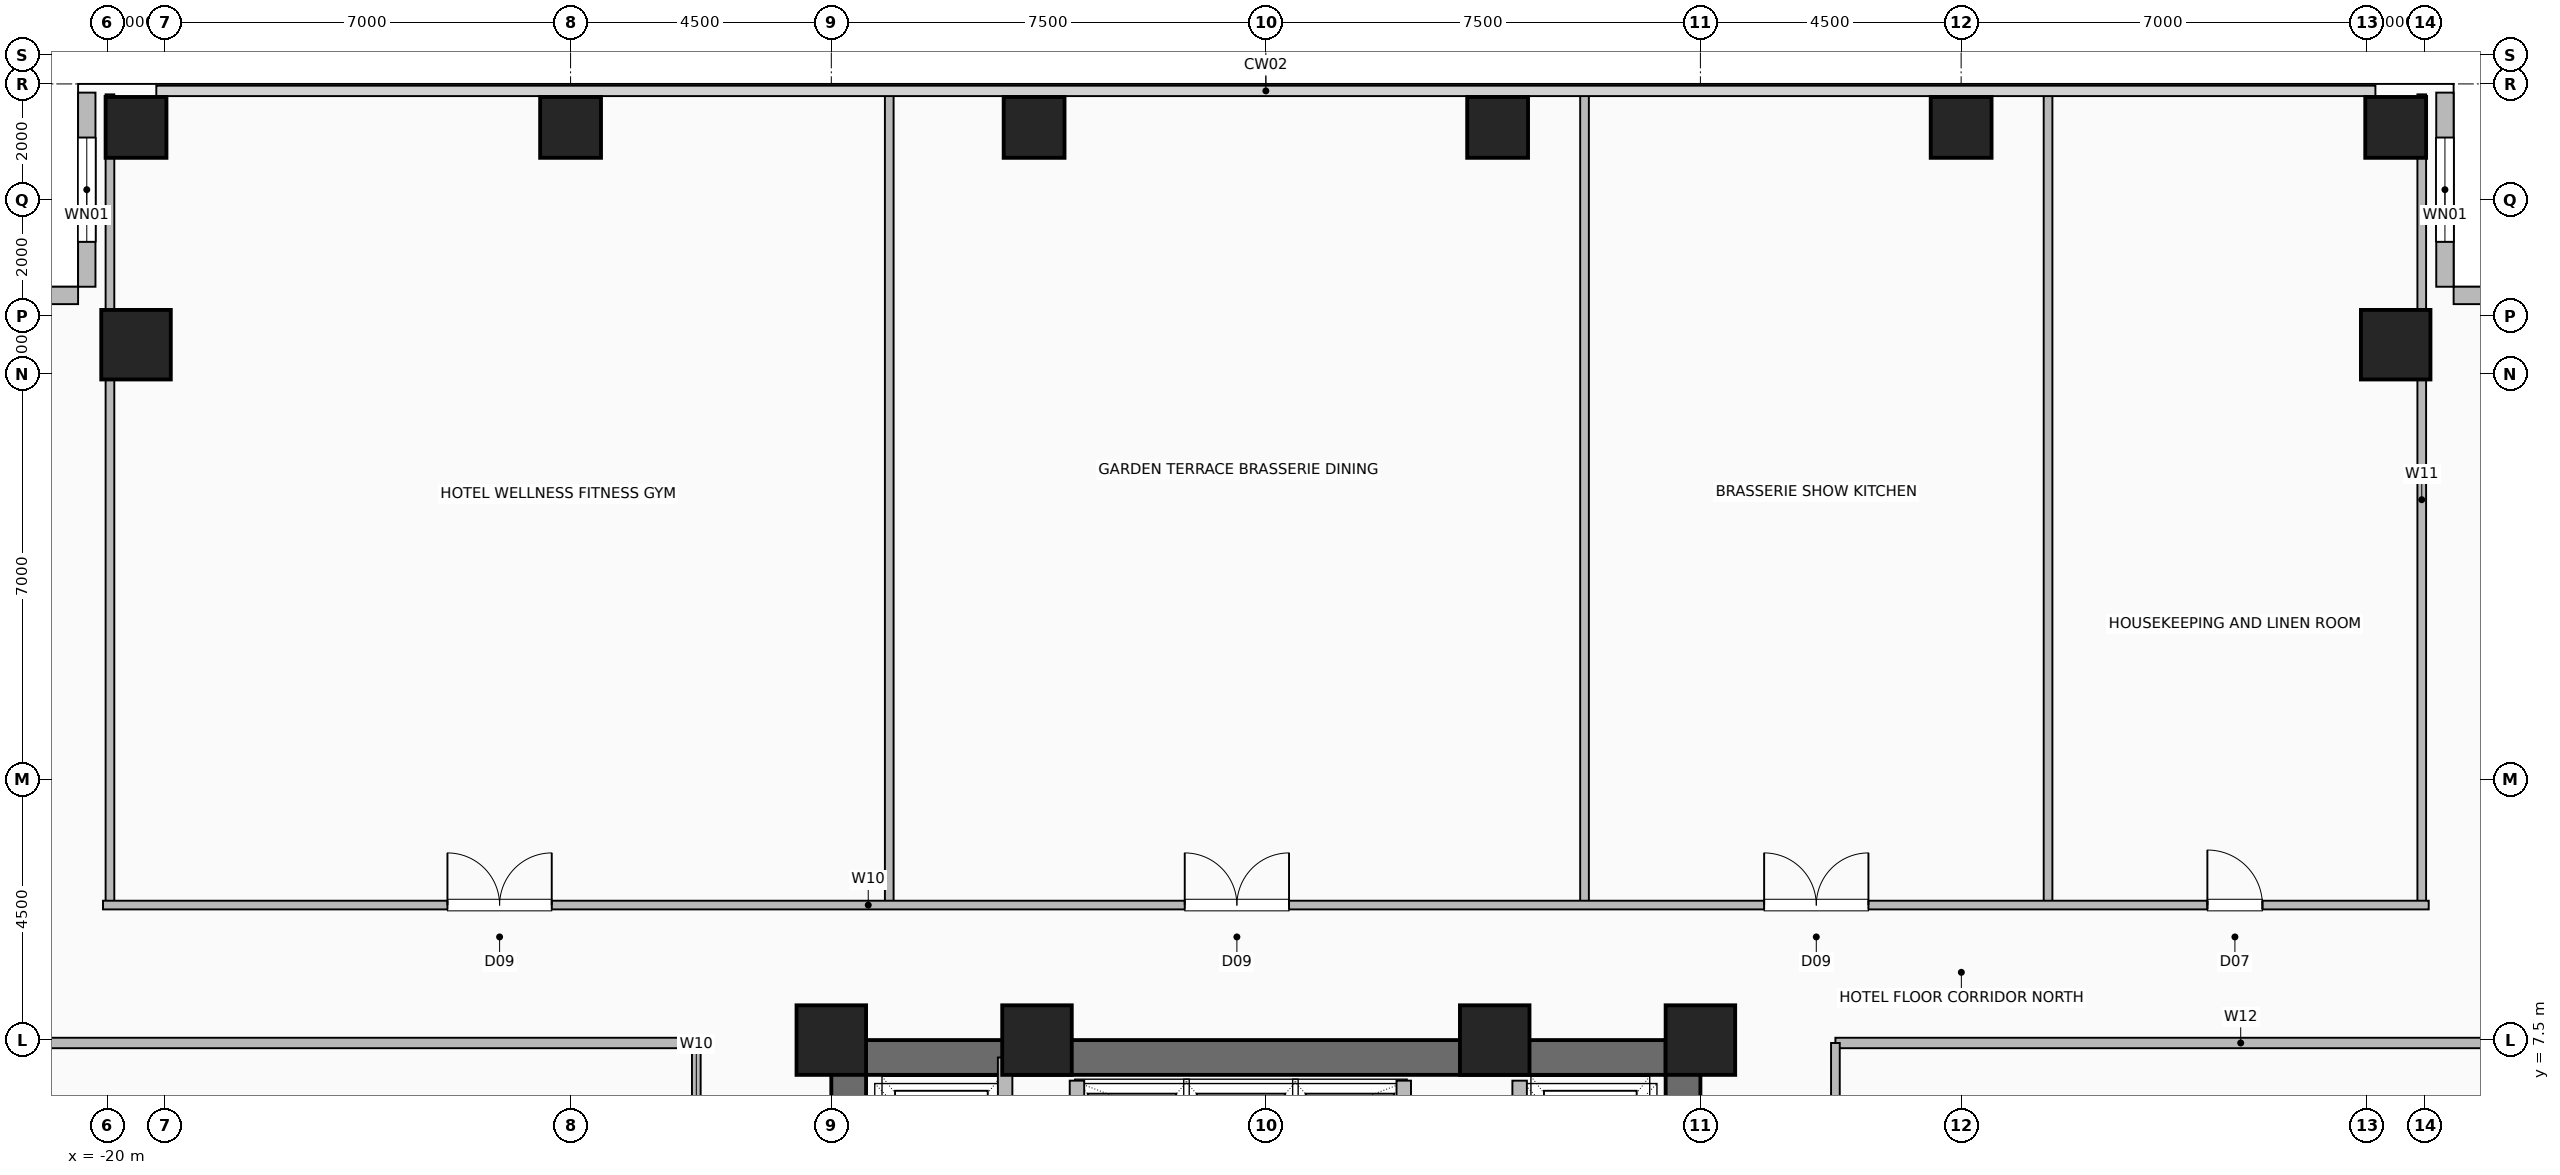
"""IFC4 building model, lengths in metres.
Left out: names, types, materials, properties, quantities, classifications, styles, units other than length and angle.
Written with IfcOpenShell. Run it as: python <this file> out.ifc"""

import sys

from ifc_helpers import new_model, si_unit, direction, frame, frame_2d, origin, origin_2d, place, context, subcontext, project, spatial, rectangle, hollow_rectangle, extrude, element, fill, save


model = new_model("IFC4")
c1 = context("Model", 3, precision=1e-05, world=origin(), true_north=direction((0.0, 1.0)))
c2 = subcontext(c1, "Body", "Model", "MODEL_VIEW")
j1 = project(units=[si_unit("LENGTHUNIT", "METRE"), si_unit("PLANEANGLEUNIT", "RADIAN")], contexts=[c1])
p1 = place(None, origin())
s1 = spatial("IfcSite", under=j1, at=p1, CompositionType="ELEMENT")
p2 = place(p1, origin())
s2 = spatial("IfcBuilding", under=s1, at=p2, CompositionType="ELEMENT")
p3 = place(p2, frame((0.0, 0.0, 51.5)))
s3 = spatial("IfcBuildingStorey", under=s2, at=p3, CompositionType="ELEMENT", Elevation=51.5)
for number, where, z_axis, x_axis in (
    (1, (7.5, 7.5, 0.0), (0.0, 0.0, 1.0), (1.0, 0.0, 0.0)),
    (2, (3.95, 7.5, 0.0), (0.0, 0.0, 1.0), (1.0, 0.0, 0.0)),
    (3, (-3.95, 7.5, 0.0), (0.0, 0.0, 1.0), (1.0, 0.0, 0.0)),
    (4, (-7.5, 7.5, 0.0), (0.0, 0.0, 1.0), (1.0, 0.0, 0.0)),
):
    element("IfcColumn", number, at=place(p3, frame(where, z_axis=z_axis, x_axis=x_axis)), inside=s3, PredefinedType="COLUMN", context=c2, shape_type="SweptSolid", body=[
        extrude(hollow_rectangle(XDim=1.2, YDim=1.2, WallThickness=0.055, at=origin_2d()), origin(), (0.0, 0.0, 1.0), 3.5),
    ])
for number, where, z_axis, x_axis in (
    (5, (-19.5, 23.25, 0.0), (0.0, 0.0, 1.0), (1.0, 0.0, 0.0)),
    (6, (-12.0, 23.25, 0.0), (0.0, 0.0, 1.0), (1.0, 0.0, 0.0)),
    (7, (-4.0, 23.25, 0.0), (0.0, 0.0, 1.0), (1.0, 0.0, 0.0)),
    (8, (4.0, 23.25, 0.0), (0.0, 0.0, 1.0), (1.0, 0.0, 0.0)),
    (9, (12.0, 23.25, 0.0), (0.0, 0.0, 1.0), (1.0, 0.0, 0.0)),
    (10, (19.5, 23.25, 0.0), (0.0, 0.0, 1.0), (1.0, 0.0, 0.0)),
):
    element("IfcColumn", number, at=place(p3, frame(where, z_axis=z_axis, x_axis=x_axis)), inside=s3, PredefinedType="COLUMN", context=c2, shape_type="SweptSolid", body=[
        extrude(hollow_rectangle(XDim=1.05, YDim=1.05, WallThickness=0.05, at=origin_2d()), origin(), (0.0, 0.0, 1.0), 3.5),
    ])
for number, where, z_axis, x_axis in (
    (11, (19.5, 19.5, 0.0), (0.0, 0.0, 1.0), (1.0, 0.0, 0.0)),
    (12, (-19.5, 19.5, 0.0), (0.0, 0.0, 1.0), (1.0, 0.0, 0.0)),
):
    element("IfcColumn", number, at=place(p3, frame(where, z_axis=z_axis, x_axis=x_axis)), inside=s3, PredefinedType="COLUMN", context=c2, shape_type="SweptSolid", body=[
        extrude(hollow_rectangle(XDim=1.2, YDim=1.2, WallThickness=0.055, at=origin_2d()), origin(), (0.0, 0.0, 1.0), 3.5),
    ])
p4 = place(p3, frame((20.35, 23.85, 0.0), z_axis=(0.0, 0.0, 1.0), x_axis=(0.0, -1.0, 0.0)))
e13 = element("IfcWall", 13, at=p4, inside=s3, PredefinedType="SOLIDWALL", context=c2, shape_type="SweptSolid", body=[
    extrude(rectangle(XDim=3.35, YDim=0.3, at=frame_2d((1.675, 0.0))), origin(), (0.0, 0.0, 1.0), 3.25),
])
p5 = place(p4, frame((0.775, 0.0, 0.9)))
e14 = element("IfcOpeningElement", 14, at=p5, cuts=e13, PredefinedType="OPENING", context=c2, shape_type="SweptSolid", body=[
    extrude(rectangle(XDim=1.8, YDim=1.8, at=frame_2d((0.9, 0.9))), frame((0.0, 0.16, 0.0), z_axis=(0.0, -1.0, 0.0), x_axis=(1.0, 0.0, 0.0)), (0.0, 0.0, 1.0), 0.32),
])
p6 = place(p3, frame((23.85, 20.35, 0.0), z_axis=(0.0, 0.0, 1.0), x_axis=(-1.0, 0.0, 0.0)))
e15 = element("IfcWall", 15, at=p6, inside=s3, PredefinedType="SOLIDWALL", context=c2, shape_type="SweptSolid", body=[
    extrude(rectangle(XDim=3.35, YDim=0.3, at=frame_2d((1.675, 0.0))), origin(), (0.0, 0.0, 1.0), 3.25),
])
p7 = place(p3, frame((-20.35, 23.85, 0.0), z_axis=(0.0, 0.0, 1.0), x_axis=(0.0, -1.0, 0.0)))
e16 = element("IfcWall", 16, at=p7, inside=s3, PredefinedType="SOLIDWALL", context=c2, shape_type="SweptSolid", body=[
    extrude(rectangle(XDim=3.35, YDim=0.3, at=frame_2d((1.675, 0.0))), origin(), (0.0, 0.0, 1.0), 3.25),
])
p8 = place(p7, frame((0.775, 0.0, 0.9)))
e17 = element("IfcOpeningElement", 17, at=p8, cuts=e16, PredefinedType="OPENING", context=c2, shape_type="SweptSolid", body=[
    extrude(rectangle(XDim=1.8, YDim=1.8, at=frame_2d((0.9, 0.9))), frame((0.0, 0.16, 0.0), z_axis=(0.0, -1.0, 0.0), x_axis=(1.0, 0.0, 0.0)), (0.0, 0.0, 1.0), 0.32),
])
p9 = place(p3, frame((-23.85, 20.35, 0.0), z_axis=(0.0, 0.0, 1.0), x_axis=(1.0, 0.0, 0.0)))
e18 = element("IfcWall", 18, at=p9, inside=s3, PredefinedType="SOLIDWALL", context=c2, shape_type="SweptSolid", body=[
    extrude(rectangle(XDim=3.35, YDim=0.3, at=frame_2d((1.675, 0.0))), origin(), (0.0, 0.0, 1.0), 3.25),
])
p10 = place(p3, frame((-7.5, 7.2, 0.0), z_axis=(0.0, 0.0, 1.0), x_axis=(1.0, 0.0, 0.0)))
e19 = element("IfcWall", 19, at=p10, inside=s3, PredefinedType="SHEAR", context=c2, shape_type="SweptSolid", body=[
    extrude(rectangle(XDim=15.0, YDim=0.6, at=frame_2d((7.5, 0.0))), origin(), (0.0, 0.0, 1.0), 3.25),
])
p11 = place(p3, frame((-7.2, -7.5, 0.0), z_axis=(0.0, 0.0, 1.0), x_axis=(0.0, 1.0, 0.0)))
e20 = element("IfcWall", 20, at=p11, inside=s3, PredefinedType="SHEAR", context=c2, shape_type="SweptSolid", body=[
    extrude(rectangle(XDim=15.0, YDim=0.6, at=frame_2d((7.5, 0.0))), origin(), (0.0, 0.0, 1.0), 3.25),
])
p12 = place(p11, frame((9.5, 0.0, 0.0)))
e21 = element("IfcOpeningElement", 21, at=p12, cuts=e20, PredefinedType="OPENING", context=c2, shape_type="SweptSolid", body=[
    extrude(rectangle(XDim=1.0, YDim=2.08, at=frame_2d((0.5, 1.04))), frame((0.0, 0.31, 0.0), z_axis=(0.0, -1.0, 0.0), x_axis=(1.0, 0.0, 0.0)), (0.0, 0.0, 1.0), 0.62),
])
p13 = place(p3, frame((7.2, -7.5, 0.0), z_axis=(0.0, 0.0, 1.0), x_axis=(0.0, 1.0, 0.0)))
e22 = element("IfcWall", 22, at=p13, inside=s3, PredefinedType="SHEAR", context=c2, shape_type="SweptSolid", body=[
    extrude(rectangle(XDim=15.0, YDim=0.6, at=frame_2d((7.5, 0.0))), origin(), (0.0, 0.0, 1.0), 3.25),
])
for number, where, z_axis, x_axis in (
    (23, (-3.26, 4.58, 0.0), (0.0, 0.0, 1.0), (0.0, 1.0, 0.0)),
    (24, (2.38, 4.58, 0.0), (0.0, 0.0, 1.0), (0.0, 1.0, 0.0)),
):
    element("IfcWall", number, at=place(p3, frame(where, z_axis=z_axis, x_axis=x_axis)), inside=s3, PredefinedType="SHEAR", context=c2, shape_type="SweptSolid", body=[
        extrude(rectangle(XDim=2.22, YDim=0.25, at=frame_2d((1.11, 0.0))), origin(), (0.0, 0.0, 1.0), 3.25),
    ])
p14 = place(p3, frame((-4.5, 4.35, 0.0), z_axis=(0.0, 0.0, 1.0), x_axis=(0.0, 1.0, 0.0)))
e25 = element("IfcWall", 25, at=p14, inside=s3, PredefinedType="SHEAR", context=c2, shape_type="SweptSolid", body=[
    extrude(rectangle(XDim=2.85, YDim=0.25, at=frame_2d((1.425, 0.0))), origin(), (0.0, 0.0, 1.0), 3.25),
])
p15 = place(p3, frame((4.38, 4.3, 0.0), z_axis=(0.0, 0.0, 1.0), x_axis=(0.0, 1.0, 0.0)))
e26 = element("IfcWall", 26, at=p15, inside=s3, PredefinedType="SHEAR", context=c2, shape_type="SweptSolid", body=[
    extrude(rectangle(XDim=2.5, YDim=0.25, at=frame_2d((1.25, 0.0))), origin(), (0.0, 0.0, 1.0), 3.25),
])
p16 = place(p15, frame((0.8, 0.0, 0.0)))
e27 = element("IfcOpeningElement", 27, at=p16, cuts=e26, PredefinedType="OPENING", context=c2, shape_type="SweptSolid", body=[
    extrude(rectangle(XDim=1.2, YDim=2.2, at=frame_2d((0.6, 1.1))), frame((0.0, 0.135, 0.0), z_axis=(0.0, -1.0, 0.0), x_axis=(1.0, 0.0, 0.0)), (0.0, 0.0, 1.0), 0.27),
])
for number, where, z_axis, x_axis in (
    (28, (-19.95, 9.83, 0.0), (0.0, 0.0, 1.0), (0.0, 1.0, 0.0)),
    (29, (-6.5, 9.83, 0.0), (0.0, 0.0, 1.0), (0.0, 1.0, 0.0)),
    (30, (5.5, 9.83, 0.0), (0.0, 0.0, 1.0), (0.0, 1.0, 0.0)),
    (31, (13.5, 9.83, 0.0), (0.0, 0.0, 1.0), (0.0, 1.0, 0.0)),
    (32, (19.95, 9.83, 0.0), (0.0, 0.0, 1.0), (0.0, 1.0, 0.0)),
):
    element("IfcWall", number, at=place(p3, frame(where, z_axis=z_axis, x_axis=x_axis)), inside=s3, PredefinedType="PARTITIONING", context=c2, shape_type="SweptSolid", body=[
        extrude(rectangle(XDim=13.99, YDim=0.15, at=frame_2d((6.995, 0.0))), origin(), (0.0, 0.0, 1.0), 3.25),
    ])
p17 = place(p3, frame((-20.07, 9.83, 0.0), z_axis=(0.0, 0.0, 1.0), x_axis=(1.0, 0.0, 0.0)))
e33 = element("IfcWall", 33, at=p17, inside=s3, PredefinedType="PARTITIONING", context=c2, shape_type="SweptSolid", body=[
    extrude(rectangle(XDim=40.14, YDim=0.15, at=frame_2d((20.07, 0.0))), origin(), (0.0, 0.0, 1.0), 3.25),
])
p18 = place(p17, frame((5.945, 0.0, 0.0)))
e34 = element("IfcOpeningElement", 34, at=p18, cuts=e33, PredefinedType="OPENING", context=c2, shape_type="SweptSolid", body=[
    extrude(rectangle(XDim=1.8, YDim=2.08, at=frame_2d((0.9, 1.04))), frame((0.0, 0.085, 0.0), z_axis=(0.0, -1.0, 0.0), x_axis=(1.0, 0.0, 0.0)), (0.0, 0.0, 1.0), 0.17),
])
p19 = place(p17, frame((18.67, 0.0, 0.0)))
e35 = element("IfcOpeningElement", 35, at=p19, cuts=e33, PredefinedType="OPENING", context=c2, shape_type="SweptSolid", body=[
    extrude(rectangle(XDim=1.8, YDim=2.08, at=frame_2d((0.9, 1.04))), frame((0.0, 0.085, 0.0), z_axis=(0.0, -1.0, 0.0), x_axis=(1.0, 0.0, 0.0)), (0.0, 0.0, 1.0), 0.17),
])
p20 = place(p17, frame((28.67, 0.0, 0.0)))
e36 = element("IfcOpeningElement", 36, at=p20, cuts=e33, PredefinedType="OPENING", context=c2, shape_type="SweptSolid", body=[
    extrude(rectangle(XDim=1.8, YDim=2.08, at=frame_2d((0.9, 1.04))), frame((0.0, 0.085, 0.0), z_axis=(0.0, -1.0, 0.0), x_axis=(1.0, 0.0, 0.0)), (0.0, 0.0, 1.0), 0.17),
])
p21 = place(p17, frame((36.32, 0.0, 0.0)))
e37 = element("IfcOpeningElement", 37, at=p21, cuts=e33, PredefinedType="OPENING", context=c2, shape_type="SweptSolid", body=[
    extrude(rectangle(XDim=0.95, YDim=2.06, at=frame_2d((0.475, 1.03))), frame((0.0, 0.085, 0.0), z_axis=(0.0, -1.0, 0.0), x_axis=(1.0, 0.0, 0.0)), (0.0, 0.0, 1.0), 0.17),
])
p22 = place(p3, frame((-23.82, 7.45, 0.0), z_axis=(0.0, 0.0, 1.0), x_axis=(1.0, 0.0, 0.0)))
e38 = element("IfcWall", 38, at=p22, inside=s3, PredefinedType="PARTITIONING", context=c2, shape_type="SweptSolid", body=[
    extrude(rectangle(XDim=13.99, YDim=0.18, at=frame_2d((6.995, 0.0))), origin(), (0.0, 0.0, 1.0), 3.25),
])
p23 = place(p3, frame((-9.83, -7.45, 0.0), z_axis=(0.0, 0.0, 1.0), x_axis=(0.0, 1.0, 0.0)))
e39 = element("IfcWall", 39, at=p23, inside=s3, PredefinedType="PARTITIONING", context=c2, shape_type="SweptSolid", body=[
    extrude(rectangle(XDim=14.9, YDim=0.15, at=frame_2d((7.45, 0.0))), origin(), (0.0, 0.0, 1.0), 3.25),
])
p24 = place(p23, frame((3.049, 0.0, 0.0)))
e40 = element("IfcOpeningElement", 40, at=p24, cuts=e39, PredefinedType="OPENING", context=c2, shape_type="SweptSolid", body=[
    extrude(rectangle(XDim=0.95, YDim=2.08, at=frame_2d((0.475, 1.04))), frame((0.0, 0.085, 0.0), z_axis=(0.0, -1.0, 0.0), x_axis=(1.0, 0.0, 0.0)), (0.0, 0.0, 1.0), 0.17),
])
p25 = place(p23, frame((7.927, 0.0, 0.0)))
e41 = element("IfcOpeningElement", 41, at=p25, cuts=e39, PredefinedType="OPENING", context=c2, shape_type="SweptSolid", body=[
    extrude(rectangle(XDim=0.95, YDim=2.08, at=frame_2d((0.475, 1.04))), frame((0.0, 0.085, 0.0), z_axis=(0.0, -1.0, 0.0), x_axis=(1.0, 0.0, 0.0)), (0.0, 0.0, 1.0), 0.17),
])
p26 = place(p23, frame((12.899, 0.0, 0.0)))
e42 = element("IfcOpeningElement", 42, at=p26, cuts=e39, PredefinedType="OPENING", context=c2, shape_type="SweptSolid", body=[
    extrude(rectangle(XDim=0.95, YDim=2.08, at=frame_2d((0.475, 1.04))), frame((0.0, 0.085, 0.0), z_axis=(0.0, -1.0, 0.0), x_axis=(1.0, 0.0, 0.0)), (0.0, 0.0, 1.0), 0.17),
])
p27 = place(p3, frame((9.83, 7.45, 0.0), z_axis=(0.0, 0.0, 1.0), x_axis=(1.0, 0.0, 0.0)))
e43 = element("IfcWall", 43, at=p27, inside=s3, PredefinedType="PARTITIONING", context=c2, shape_type="SweptSolid", body=[
    extrude(rectangle(XDim=13.99, YDim=0.18, at=frame_2d((6.995, 0.0))), origin(), (0.0, 0.0, 1.0), 3.25),
])
p28 = place(p3, frame((9.83, -7.45, 0.0), z_axis=(0.0, 0.0, 1.0), x_axis=(0.0, 1.0, 0.0)))
e44 = element("IfcWall", 44, at=p28, inside=s3, PredefinedType="PARTITIONING", context=c2, shape_type="SweptSolid", body=[
    extrude(rectangle(XDim=14.9, YDim=0.15, at=frame_2d((7.45, 0.0))), origin(), (0.0, 0.0, 1.0), 3.25),
])
p29 = place(p28, frame((3.049, 0.0, 0.0)))
e45 = element("IfcOpeningElement", 45, at=p29, cuts=e44, PredefinedType="OPENING", context=c2, shape_type="SweptSolid", body=[
    extrude(rectangle(XDim=0.95, YDim=2.08, at=frame_2d((0.475, 1.04))), frame((0.0, 0.085, 0.0), z_axis=(0.0, -1.0, 0.0), x_axis=(1.0, 0.0, 0.0)), (0.0, 0.0, 1.0), 0.17),
])
p30 = place(p28, frame((7.927, 0.0, 0.0)))
e46 = element("IfcOpeningElement", 46, at=p30, cuts=e44, PredefinedType="OPENING", context=c2, shape_type="SweptSolid", body=[
    extrude(rectangle(XDim=0.95, YDim=2.08, at=frame_2d((0.475, 1.04))), frame((0.0, 0.085, 0.0), z_axis=(0.0, -1.0, 0.0), x_axis=(1.0, 0.0, 0.0)), (0.0, 0.0, 1.0), 0.17),
])
p31 = place(p28, frame((12.899, 0.0, 0.0)))
e47 = element("IfcOpeningElement", 47, at=p31, cuts=e44, PredefinedType="OPENING", context=c2, shape_type="SweptSolid", body=[
    extrude(rectangle(XDim=0.95, YDim=2.08, at=frame_2d((0.475, 1.04))), frame((0.0, 0.085, 0.0), z_axis=(0.0, -1.0, 0.0), x_axis=(1.0, 0.0, 0.0)), (0.0, 0.0, 1.0), 0.17),
])
p32 = place(p5, origin())
e48 = element("IfcWindow", 48, at=p32, inside=s3, PartitioningType="SINGLE_PANEL", PredefinedType="WINDOW", context=c2, shape_type="SweptSolid", body=[
    extrude(rectangle(XDim=1.8, YDim=1.8, at=frame_2d((0.9, 0.9))), frame((0.0, 0.03, 0.0), z_axis=(0.0, -1.0, 0.0), x_axis=(1.0, 0.0, 0.0)), (0.0, 0.0, 1.0), 0.06),
])
fill(e14, e48)
p33 = place(p8, origin())
e49 = element("IfcWindow", 49, at=p33, inside=s3, PartitioningType="SINGLE_PANEL", PredefinedType="WINDOW", context=c2, shape_type="SweptSolid", body=[
    extrude(rectangle(XDim=1.8, YDim=1.8, at=frame_2d((0.9, 0.9))), frame((0.0, 0.03, 0.0), z_axis=(0.0, -1.0, 0.0), x_axis=(1.0, 0.0, 0.0)), (0.0, 0.0, 1.0), 0.06),
])
fill(e17, e49)
p34 = place(p18, origin())
e50 = element("IfcDoor", 50, at=p34, inside=s3, OperationType="DOUBLE_DOOR_SINGLE_SWING", PredefinedType="DOOR", context=c2, shape_type="SweptSolid", body=[
    extrude(rectangle(XDim=1.8, YDim=2.08, at=frame_2d((0.9, 1.04))), frame((0.0, 0.025, 0.0), z_axis=(0.0, -1.0, 0.0), x_axis=(1.0, 0.0, 0.0)), (0.0, 0.0, 1.0), 0.05),
])
fill(e34, e50)
p35 = place(p19, origin())
e51 = element("IfcDoor", 51, at=p35, inside=s3, OperationType="DOUBLE_DOOR_SINGLE_SWING", PredefinedType="DOOR", context=c2, shape_type="SweptSolid", body=[
    extrude(rectangle(XDim=1.8, YDim=2.08, at=frame_2d((0.9, 1.04))), frame((0.0, 0.025, 0.0), z_axis=(0.0, -1.0, 0.0), x_axis=(1.0, 0.0, 0.0)), (0.0, 0.0, 1.0), 0.05),
])
fill(e35, e51)
p36 = place(p20, origin())
e52 = element("IfcDoor", 52, at=p36, inside=s3, OperationType="DOUBLE_DOOR_SINGLE_SWING", PredefinedType="DOOR", context=c2, shape_type="SweptSolid", body=[
    extrude(rectangle(XDim=1.8, YDim=2.08, at=frame_2d((0.9, 1.04))), frame((0.0, 0.025, 0.0), z_axis=(0.0, -1.0, 0.0), x_axis=(1.0, 0.0, 0.0)), (0.0, 0.0, 1.0), 0.05),
])
fill(e36, e52)
p37 = place(p21, origin())
e53 = element("IfcDoor", 53, at=p37, inside=s3, OperationType="SINGLE_SWING_LEFT", PredefinedType="DOOR", context=c2, shape_type="SweptSolid", body=[
    extrude(rectangle(XDim=0.95, YDim=2.06, at=frame_2d((0.475, 1.03))), frame((0.0, 0.025, 0.0), z_axis=(0.0, -1.0, 0.0), x_axis=(1.0, 0.0, 0.0)), (0.0, 0.0, 1.0), 0.05),
])
fill(e37, e53)
save(model, sys.argv[1])
